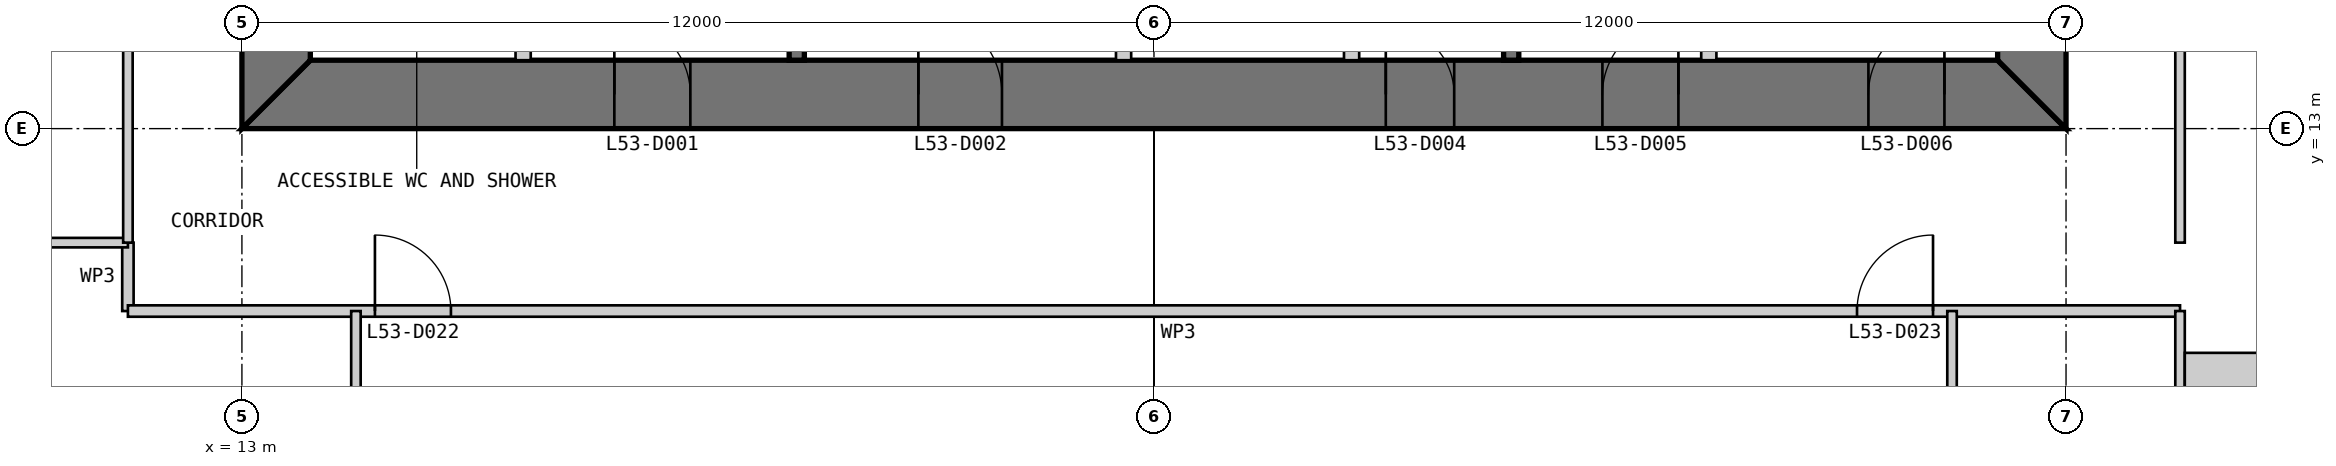
"""IFC4 building model, lengths in metres.
Left out: names, types, materials, properties, quantities, classifications, styles, units other than length and angle.
Written with IfcOpenShell. Run it as: python <this file> out.ifc"""

import sys

from ifc_helpers import new_model, si_unit, direction, frame, frame_2d, origin, place, context, subcontext, project, spatial, polyline, rectangle, outline, extrude, element, fill, save


model = new_model("IFC4")
c1 = context("Model", 3, precision=1e-05, world=origin(), true_north=direction((0.0, 1.0)))
c2 = subcontext(c1, "Body", "Model", "MODEL_VIEW")
j1 = project(units=[si_unit("LENGTHUNIT", "METRE"), si_unit("PLANEANGLEUNIT", "RADIAN")], contexts=[c1])
p1 = place(None, origin())
s1 = spatial("IfcSite", under=j1, at=p1, CompositionType="ELEMENT")
p2 = place(p1, origin())
s2 = spatial("IfcBuilding", under=s1, at=p2, CompositionType="ELEMENT")
p3 = place(p2, frame((0.0, 0.0, 225.8)))
s3 = spatial("IfcBuildingStorey", under=s2, at=p3, CompositionType="ELEMENT", Elevation=225.8)
p4 = place(p3, frame((13.0, 13.45, 0.0), z_axis=(0.0, 0.0, 1.0), x_axis=(1.0, 0.0, 0.0)))
e1 = element("IfcWall", 1, at=p4, inside=s3, PredefinedType="SHEAR", context=c2, shape_type="SweptSolid", body=[
    extrude(outline(polyline([(0.0, -0.45), (24.0, -0.45), (23.1, 0.45), (0.9, 0.45), (0.0, -0.45)])), origin(), (0.0, 0.0, 1.0), 4.0),
])
p5 = place(p4, frame((4.9, 0.0, 0.0)))
e2 = element("IfcOpeningElement", 2, at=p5, cuts=e1, PredefinedType="OPENING", context=c2, shape_type="SweptSolid", body=[
    extrude(rectangle(XDim=1.0, YDim=2.2, at=frame_2d((0.5, 1.1))), frame((0.0, 0.46, 0.0), z_axis=(0.0, -1.0, 0.0), x_axis=(1.0, 0.0, 0.0)), (0.0, 0.0, 1.0), 0.92),
])
p6 = place(p4, frame((8.9, 0.0, 0.0)))
e3 = element("IfcOpeningElement", 3, at=p6, cuts=e1, PredefinedType="OPENING", context=c2, shape_type="SweptSolid", body=[
    extrude(rectangle(XDim=1.1, YDim=2.2, at=frame_2d((0.55, 1.1))), frame((0.0, 0.46, 0.0), z_axis=(0.0, -1.0, 0.0), x_axis=(1.0, 0.0, 0.0)), (0.0, 0.0, 1.0), 0.92),
])
p7 = place(p4, frame((15.05, 0.0, 0.0)))
e4 = element("IfcOpeningElement", 4, at=p7, cuts=e1, PredefinedType="OPENING", context=c2, shape_type="SweptSolid", body=[
    extrude(rectangle(XDim=0.9, YDim=2.2, at=frame_2d((0.45, 1.1))), frame((0.0, 0.46, 0.0), z_axis=(0.0, -1.0, 0.0), x_axis=(1.0, 0.0, 0.0)), (0.0, 0.0, 1.0), 0.92),
])
p8 = place(p4, frame((17.9, 0.0, 0.0)))
e5 = element("IfcOpeningElement", 5, at=p8, cuts=e1, PredefinedType="OPENING", context=c2, shape_type="SweptSolid", body=[
    extrude(rectangle(XDim=1.0, YDim=2.2, at=frame_2d((0.5, 1.1))), frame((0.0, 0.46, 0.0), z_axis=(0.0, -1.0, 0.0), x_axis=(1.0, 0.0, 0.0)), (0.0, 0.0, 1.0), 0.92),
])
p9 = place(p4, frame((21.4, 0.0, 0.0)))
e6 = element("IfcOpeningElement", 6, at=p9, cuts=e1, PredefinedType="OPENING", context=c2, shape_type="SweptSolid", body=[
    extrude(rectangle(XDim=1.0, YDim=2.2, at=frame_2d((0.5, 1.1))), frame((0.0, 0.46, 0.0), z_axis=(0.0, -1.0, 0.0), x_axis=(1.0, 0.0, 0.0)), (0.0, 0.0, 1.0), 0.92),
])
p10 = place(p3, frame((36.55, 13.9, 0.0), z_axis=(0.0, 0.0, 1.0), x_axis=(0.0, 1.0, 0.0)))
e7 = element("IfcWall", 7, at=p10, inside=s3, PredefinedType="SHEAR", context=c2, shape_type="SweptSolid", body=[
    extrude(outline(polyline([(-0.9, -0.45), (23.1, -0.45), (22.2, 0.45), (0.0, 0.45), (-0.9, -0.45)])), origin(), (0.0, 0.0, 1.0), 4.0),
])
p11 = place(p10, frame((20.2, 0.0, 0.0)))
e8 = element("IfcOpeningElement", 8, at=p11, cuts=e7, PredefinedType="OPENING", context=c2, shape_type="SweptSolid", body=[
    extrude(rectangle(XDim=1.0, YDim=2.2, at=frame_2d((0.5, 1.1))), frame((0.0, 0.46, 0.0), z_axis=(0.0, -1.0, 0.0), x_axis=(1.0, 0.0, 0.0)), (0.0, 0.0, 1.0), 0.92),
])
p12 = place(p10, frame((17.25, 0.0, 0.0)))
e9 = element("IfcOpeningElement", 9, at=p12, cuts=e7, PredefinedType="OPENING", context=c2, shape_type="SweptSolid", body=[
    extrude(rectangle(XDim=0.9, YDim=2.2, at=frame_2d((0.45, 1.1))), frame((0.0, 0.46, 0.0), z_axis=(0.0, -1.0, 0.0), x_axis=(1.0, 0.0, 0.0)), (0.0, 0.0, 1.0), 0.92),
])
p13 = place(p3, frame((13.45, 36.1, 0.0), z_axis=(0.0, 0.0, 1.0), x_axis=(0.0, -1.0, 0.0)))
e10 = element("IfcWall", 10, at=p13, inside=s3, PredefinedType="SHEAR", context=c2, shape_type="SweptSolid", body=[
    extrude(outline(polyline([(-0.9, -0.45), (23.1, -0.45), (22.2, 0.45), (0.0, 0.45), (-0.9, -0.45)])), origin(), (0.0, 0.0, 1.0), 4.0),
])
p14 = place(p13, frame((20.2, 0.0, 0.0)))
e11 = element("IfcOpeningElement", 11, at=p14, cuts=e10, PredefinedType="OPENING", context=c2, shape_type="SweptSolid", body=[
    extrude(rectangle(XDim=1.0, YDim=2.2, at=frame_2d((0.5, 1.1))), frame((0.0, 0.46, 0.0), z_axis=(0.0, -1.0, 0.0), x_axis=(1.0, 0.0, 0.0)), (0.0, 0.0, 1.0), 0.92),
])
p15 = place(p13, frame((17.25, 0.0, 0.0)))
e12 = element("IfcOpeningElement", 12, at=p15, cuts=e10, PredefinedType="OPENING", context=c2, shape_type="SweptSolid", body=[
    extrude(rectangle(XDim=0.9, YDim=2.2, at=frame_2d((0.45, 1.1))), frame((0.0, 0.46, 0.0), z_axis=(0.0, -1.0, 0.0), x_axis=(1.0, 0.0, 0.0)), (0.0, 0.0, 1.0), 0.92),
])
p16 = place(p3, frame((16.7, 13.9, 0.0), z_axis=(0.0, 0.0, 1.0), x_axis=(0.0, 1.0, 0.0)))
e13 = element("IfcWall", 13, at=p16, inside=s3, PredefinedType="PARTITIONING", context=c2, shape_type="SweptSolid", body=[
    extrude(rectangle(XDim=16.1, YDim=0.2, at=frame_2d((8.05, 0.0))), origin(), (0.0, 0.0, 1.0), 3.8),
])
p17 = place(p16, frame((13.4, 0.0, 0.0)))
e14 = element("IfcOpeningElement", 14, at=p17, cuts=e13, PredefinedType="OPENING", context=c2, shape_type="SweptSolid", body=[
    extrude(rectangle(XDim=0.9, YDim=2.2, at=frame_2d((0.45, 1.1))), frame((0.0, 0.11, 0.0), z_axis=(0.0, -1.0, 0.0), x_axis=(1.0, 0.0, 0.0)), (0.0, 0.0, 1.0), 0.22),
])
p18 = place(p3, frame((20.3, 13.9, 0.0), z_axis=(0.0, 0.0, 1.0), x_axis=(0.0, 1.0, 0.0)))
e15 = element("IfcWall", 15, at=p18, inside=s3, PredefinedType="SOLIDWALL", context=c2, shape_type="SweptSolid", body=[
    extrude(rectangle(XDim=16.1, YDim=0.2, at=frame_2d((8.05, 0.0))), origin(), (0.0, 0.0, 1.0), 3.8),
])
p19 = place(p18, frame((6.65, 0.0, 0.0)))
e16 = element("IfcOpeningElement", 16, at=p19, cuts=e15, PredefinedType="OPENING", context=c2, shape_type="SweptSolid", body=[
    extrude(rectangle(XDim=0.9, YDim=2.2, at=frame_2d((0.45, 1.1))), frame((0.0, 0.11, 0.0), z_axis=(0.0, -1.0, 0.0), x_axis=(1.0, 0.0, 0.0)), (0.0, 0.0, 1.0), 0.22),
])
p20 = place(p18, frame((9.1, 0.0, 0.0)))
e17 = element("IfcOpeningElement", 17, at=p20, cuts=e15, PredefinedType="OPENING", context=c2, shape_type="SweptSolid", body=[
    extrude(rectangle(XDim=1.0, YDim=2.2, at=frame_2d((0.5, 1.1))), frame((0.0, 0.11, 0.0), z_axis=(0.0, -1.0, 0.0), x_axis=(1.0, 0.0, 0.0)), (0.0, 0.0, 1.0), 0.22),
])
p21 = place(p18, frame((13.15, 0.0, 0.0)))
e18 = element("IfcOpeningElement", 18, at=p21, cuts=e15, PredefinedType="OPENING", context=c2, shape_type="SweptSolid", body=[
    extrude(rectangle(XDim=0.9, YDim=2.2, at=frame_2d((0.45, 1.1))), frame((0.0, 0.11, 0.0), z_axis=(0.0, -1.0, 0.0), x_axis=(1.0, 0.0, 0.0)), (0.0, 0.0, 1.0), 0.22),
])
p22 = place(p3, frame((24.6, 13.9, 0.0), z_axis=(0.0, 0.0, 1.0), x_axis=(0.0, 1.0, 0.0)))
e19 = element("IfcWall", 19, at=p22, inside=s3, PredefinedType="PARTITIONING", context=c2, shape_type="SweptSolid", body=[
    extrude(rectangle(XDim=3.3, YDim=0.2, at=frame_2d((1.65, 0.0))), origin(), (0.0, 0.0, 1.0), 3.8),
])
p23 = place(p22, frame((0.9, 0.0, 0.0)))
e20 = element("IfcOpeningElement", 20, at=p23, cuts=e19, PredefinedType="OPENING", context=c2, shape_type="SweptSolid", body=[
    extrude(rectangle(XDim=1.1, YDim=2.2, at=frame_2d((0.55, 1.1))), frame((0.0, 0.11, 0.0), z_axis=(0.0, -1.0, 0.0), x_axis=(1.0, 0.0, 0.0)), (0.0, 0.0, 1.0), 0.22),
])
p24 = place(p3, frame((27.6, 13.9, 0.0), z_axis=(0.0, 0.0, 1.0), x_axis=(0.0, 1.0, 0.0)))
e21 = element("IfcWall", 21, at=p24, inside=s3, PredefinedType="PARTITIONING", context=c2, shape_type="SweptSolid", body=[
    extrude(rectangle(XDim=3.3, YDim=0.2, at=frame_2d((1.65, 0.0))), origin(), (0.0, 0.0, 1.0), 3.8),
])
p25 = place(p3, frame((29.7, 13.9, 0.0), z_axis=(0.0, 0.0, 1.0), x_axis=(0.0, 1.0, 0.0)))
e22 = element("IfcWall", 22, at=p25, inside=s3, PredefinedType="SOLIDWALL", context=c2, shape_type="SweptSolid", body=[
    extrude(rectangle(XDim=6.1, YDim=0.2, at=frame_2d((3.05, 0.0))), origin(), (0.0, 0.0, 1.0), 3.8),
])
p26 = place(p3, frame((32.3, 13.9, 0.0), z_axis=(0.0, 0.0, 1.0), x_axis=(0.0, 1.0, 0.0)))
e23 = element("IfcWall", 23, at=p26, inside=s3, PredefinedType="PARTITIONING", context=c2, shape_type="SweptSolid", body=[
    extrude(rectangle(XDim=6.1, YDim=0.2, at=frame_2d((3.05, 0.0))), origin(), (0.0, 0.0, 1.0), 3.8),
])
p27 = place(p3, frame((11.5, 11.5, 0.0), z_axis=(0.0, 0.0, 1.0), x_axis=(0.0, -1.0, 0.0)))
e24 = element("IfcWall", 24, at=p27, inside=s3, PredefinedType="PARTITIONING", context=c2, shape_type="SweptSolid", body=[
    extrude(rectangle(XDim=0.9, YDim=0.15, at=frame_2d((0.45, 0.0))), origin(), (0.0, 0.0, 1.0), 3.85),
])
p28 = place(p3, frame((11.5, 10.6, 0.0), z_axis=(0.0, 0.0, 1.0), x_axis=(1.0, 0.0, 0.0)))
e25 = element("IfcWall", 25, at=p28, inside=s3, PredefinedType="PARTITIONING", context=c2, shape_type="SweptSolid", body=[
    extrude(rectangle(XDim=27.0, YDim=0.15, at=frame_2d((13.5, 0.0))), origin(), (0.0, 0.0, 1.0), 3.85),
])
p29 = place(p28, frame((3.25, 0.0, 0.0)))
e26 = element("IfcOpeningElement", 26, at=p29, cuts=e25, PredefinedType="OPENING", context=c2, shape_type="SweptSolid", body=[
    extrude(rectangle(XDim=1.0, YDim=2.2, at=frame_2d((0.5, 1.1))), frame((0.0, 0.085, 0.0), z_axis=(0.0, -1.0, 0.0), x_axis=(1.0, 0.0, 0.0)), (0.0, 0.0, 1.0), 0.17),
])
p30 = place(p28, frame((22.75, 0.0, 0.0)))
e27 = element("IfcOpeningElement", 27, at=p30, cuts=e25, PredefinedType="OPENING", context=c2, shape_type="SweptSolid", body=[
    extrude(rectangle(XDim=1.0, YDim=2.2, at=frame_2d((0.5, 1.1))), frame((0.0, 0.085, 0.0), z_axis=(0.0, -1.0, 0.0), x_axis=(1.0, 0.0, 0.0)), (0.0, 0.0, 1.0), 0.17),
])
p31 = place(p3, frame((0.15, 11.5, 0.0), z_axis=(0.0, 0.0, 1.0), x_axis=(1.0, 0.0, 0.0)))
e28 = element("IfcWall", 28, at=p31, inside=s3, PredefinedType="PARTITIONING", context=c2, shape_type="SweptSolid", body=[
    extrude(rectangle(XDim=11.35, YDim=0.125, at=frame_2d((5.675, 0.0))), origin(), (0.0, 0.0, 1.0), 3.85),
])
p32 = place(p3, frame((14.5, 0.15, 0.0), z_axis=(0.0, 0.0, 1.0), x_axis=(0.0, 1.0, 0.0)))
e29 = element("IfcWall", 29, at=p32, inside=s3, PredefinedType="PARTITIONING", context=c2, shape_type="SweptSolid", body=[
    extrude(rectangle(XDim=10.45, YDim=0.125, at=frame_2d((5.225, 0.0))), origin(), (0.0, 0.0, 1.0), 3.85),
])
p33 = place(p32, frame((8.15, 0.0, 0.0)))
e30 = element("IfcOpeningElement", 30, at=p33, cuts=e29, PredefinedType="OPENING", context=c2, shape_type="SweptSolid", body=[
    extrude(rectangle(XDim=1.0, YDim=2.2, at=frame_2d((0.5, 1.1))), frame((0.0, 0.073, 0.0), z_axis=(0.0, -1.0, 0.0), x_axis=(1.0, 0.0, 0.0)), (0.0, 0.0, 1.0), 0.145),
])
p34 = place(p3, frame((35.5, 7.0, 0.0), z_axis=(0.0, 0.0, 1.0), x_axis=(0.0, 1.0, 0.0)))
e31 = element("IfcWall", 31, at=p34, inside=s3, PredefinedType="PARTITIONING", context=c2, shape_type="SweptSolid", body=[
    extrude(rectangle(XDim=3.6, YDim=0.125, at=frame_2d((1.8, 0.0))), origin(), (0.0, 0.0, 1.0), 3.85),
])
p35 = place(p34, frame((1.35, 0.0, 0.0)))
e32 = element("IfcOpeningElement", 32, at=p35, cuts=e31, PredefinedType="OPENING", context=c2, shape_type="SweptSolid", body=[
    extrude(rectangle(XDim=0.9, YDim=2.2, at=frame_2d((0.45, 1.1))), frame((0.0, 0.073, 0.0), z_axis=(0.0, -1.0, 0.0), x_axis=(1.0, 0.0, 0.0)), (0.0, 0.0, 1.0), 0.145),
])
p36 = place(p3, frame((38.5, 0.15, 0.0), z_axis=(0.0, 0.0, 1.0), x_axis=(0.0, 1.0, 0.0)))
e33 = element("IfcWall", 33, at=p36, inside=s3, PredefinedType="PARTITIONING", context=c2, shape_type="SweptSolid", body=[
    extrude(rectangle(XDim=10.45, YDim=0.125, at=frame_2d((5.225, 0.0))), origin(), (0.0, 0.0, 1.0), 3.85),
])
for number, where, z_axis, x_axis in (
    (34, (38.5, 11.5, 0.0), (0.0, 0.0, 1.0), (0.0, 1.0, 0.0)),
    (35, (11.5, 14.5, 0.0), (0.0, 0.0, 1.0), (0.0, -1.0, 0.0)),
):
    element("IfcWall", number, at=place(p3, frame(where, z_axis=z_axis, x_axis=x_axis)), inside=s3, PredefinedType="PARTITIONING", context=c2, shape_type="SweptSolid", body=[
        extrude(rectangle(XDim=3.0, YDim=0.125, at=frame_2d((1.5, 0.0))), origin(), (0.0, 0.0, 1.0), 3.85),
    ])
p37 = place(p3, frame((38.562, 9.0, 0.0), z_axis=(0.0, 0.0, 1.0), x_axis=(1.0, 0.0, 0.0)))
e36 = element("IfcWall", 36, at=p37, inside=s3, PredefinedType="PARTITIONING", context=c2, shape_type="SweptSolid", body=[
    extrude(rectangle(XDim=1.438, YDim=2.1, at=frame_2d((0.719, 0.0))), origin(), (0.0, 0.0, 1.0), 3.85),
])
p38 = place(p5, origin())
e37 = element("IfcDoor", 37, at=p38, inside=s3, OperationType="SINGLE_SWING_LEFT", PredefinedType="DOOR", context=c2, shape_type="SweptSolid", body=[
    extrude(rectangle(XDim=1.0, YDim=2.2, at=frame_2d((0.5, 1.1))), frame((0.0, 0.025, 0.0), z_axis=(0.0, -1.0, 0.0), x_axis=(1.0, 0.0, 0.0)), (0.0, 0.0, 1.0), 0.05),
    extrude(outline(polyline([(0.0, 0.0), (0.04, 0.0), (0.04, 2.16), (0.96, 2.16), (0.96, 0.0), (1.0, 0.0), (1.0, 2.2), (0.0, 2.2), (0.0, 0.0)])), frame((0.0, 0.3, 0.0), z_axis=(0.0, -1.0, 0.0), x_axis=(1.0, 0.0, 0.0)), (0.0, 0.0, 1.0), 0.6),
])
fill(e2, e37)
p39 = place(p6, origin())
e38 = element("IfcDoor", 38, at=p39, inside=s3, OperationType="SINGLE_SWING_LEFT", PredefinedType="DOOR", context=c2, shape_type="SweptSolid", body=[
    extrude(rectangle(XDim=1.1, YDim=2.2, at=frame_2d((0.55, 1.1))), frame((0.0, 0.025, 0.0), z_axis=(0.0, -1.0, 0.0), x_axis=(1.0, 0.0, 0.0)), (0.0, 0.0, 1.0), 0.05),
    extrude(outline(polyline([(0.0, 0.0), (0.04, 0.0), (0.04, 2.16), (1.06, 2.16), (1.06, 0.0), (1.1, 0.0), (1.1, 2.2), (0.0, 2.2), (0.0, 0.0)])), frame((0.0, 0.3, 0.0), z_axis=(0.0, -1.0, 0.0), x_axis=(1.0, 0.0, 0.0)), (0.0, 0.0, 1.0), 0.6),
])
fill(e3, e38)
p40 = place(p7, origin())
e39 = element("IfcDoor", 39, at=p40, inside=s3, OperationType="SINGLE_SWING_LEFT", PredefinedType="DOOR", context=c2, shape_type="SweptSolid", body=[
    extrude(rectangle(XDim=0.9, YDim=2.2, at=frame_2d((0.45, 1.1))), frame((0.0, 0.025, 0.0), z_axis=(0.0, -1.0, 0.0), x_axis=(1.0, 0.0, 0.0)), (0.0, 0.0, 1.0), 0.05),
    extrude(outline(polyline([(0.0, 0.0), (0.04, 0.0), (0.04, 2.16), (0.86, 2.16), (0.86, 0.0), (0.9, 0.0), (0.9, 2.2), (0.0, 2.2), (0.0, 0.0)])), frame((0.0, 0.3, 0.0), z_axis=(0.0, -1.0, 0.0), x_axis=(1.0, 0.0, 0.0)), (0.0, 0.0, 1.0), 0.6),
])
fill(e4, e39)
p41 = place(p8, origin())
e40 = element("IfcDoor", 40, at=p41, inside=s3, OperationType="SINGLE_SWING_RIGHT", PredefinedType="DOOR", context=c2, shape_type="SweptSolid", body=[
    extrude(rectangle(XDim=1.0, YDim=2.2, at=frame_2d((0.5, 1.1))), frame((0.0, 0.025, 0.0), z_axis=(0.0, -1.0, 0.0), x_axis=(1.0, 0.0, 0.0)), (0.0, 0.0, 1.0), 0.05),
    extrude(outline(polyline([(0.0, 0.0), (0.04, 0.0), (0.04, 2.16), (0.96, 2.16), (0.96, 0.0), (1.0, 0.0), (1.0, 2.2), (0.0, 2.2), (0.0, 0.0)])), frame((0.0, 0.3, 0.0), z_axis=(0.0, -1.0, 0.0), x_axis=(1.0, 0.0, 0.0)), (0.0, 0.0, 1.0), 0.6),
])
fill(e5, e40)
p42 = place(p9, origin())
e41 = element("IfcDoor", 41, at=p42, inside=s3, OperationType="SINGLE_SWING_RIGHT", PredefinedType="DOOR", context=c2, shape_type="SweptSolid", body=[
    extrude(rectangle(XDim=1.0, YDim=2.2, at=frame_2d((0.5, 1.1))), frame((0.0, 0.025, 0.0), z_axis=(0.0, -1.0, 0.0), x_axis=(1.0, 0.0, 0.0)), (0.0, 0.0, 1.0), 0.05),
    extrude(outline(polyline([(0.0, 0.0), (0.04, 0.0), (0.04, 2.16), (0.96, 2.16), (0.96, 0.0), (1.0, 0.0), (1.0, 2.2), (0.0, 2.2), (0.0, 0.0)])), frame((0.0, 0.3, 0.0), z_axis=(0.0, -1.0, 0.0), x_axis=(1.0, 0.0, 0.0)), (0.0, 0.0, 1.0), 0.6),
])
fill(e6, e41)
p43 = place(p29, origin())
e42 = element("IfcDoor", 42, at=p43, inside=s3, OperationType="SINGLE_SWING_LEFT", PredefinedType="DOOR", context=c2, shape_type="SweptSolid", body=[
    extrude(rectangle(XDim=1.0, YDim=2.2, at=frame_2d((0.5, 1.1))), frame((0.0, 0.025, 0.0), z_axis=(0.0, -1.0, 0.0), x_axis=(1.0, 0.0, 0.0)), (0.0, 0.0, 1.0), 0.05),
])
fill(e26, e42)
p44 = place(p30, origin())
e43 = element("IfcDoor", 43, at=p44, inside=s3, OperationType="SINGLE_SWING_RIGHT", PredefinedType="DOOR", context=c2, shape_type="SweptSolid", body=[
    extrude(rectangle(XDim=1.0, YDim=2.2, at=frame_2d((0.5, 1.1))), frame((0.0, 0.025, 0.0), z_axis=(0.0, -1.0, 0.0), x_axis=(1.0, 0.0, 0.0)), (0.0, 0.0, 1.0), 0.05),
])
fill(e27, e43)
save(model, sys.argv[1])
